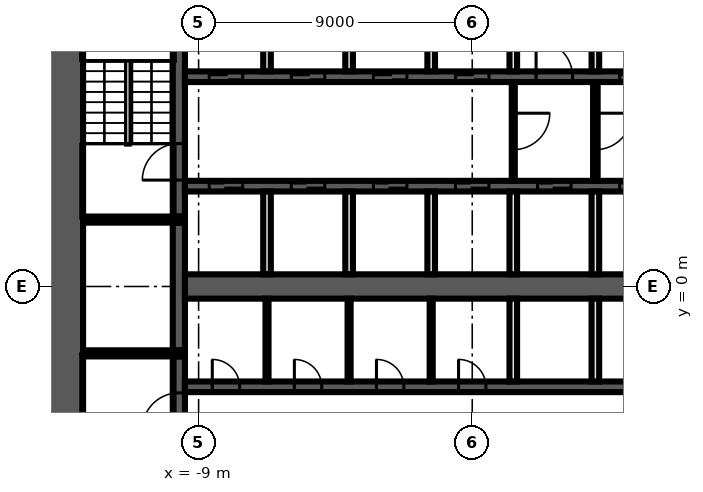
"""IFC4 building model, lengths in metres.
Left out: names, types, materials, properties, quantities, classifications, styles, units other than length and angle.
Written with IfcOpenShell. Run it as: python <this file> out.ifc"""

import sys

from ifc_helpers import new_model, si_unit, direction, frame, frame_2d, origin, place, context, subcontext, project, spatial, rectangle, extrude, element, fill, save


model = new_model("IFC4")
c1 = context("Model", 3, precision=1e-05, world=origin(), true_north=direction((0.0, 1.0)))
c2 = subcontext(c1, "Body", "Model", "MODEL_VIEW")
j1 = project(units=[si_unit("LENGTHUNIT", "METRE"), si_unit("PLANEANGLEUNIT", "RADIAN")], contexts=[c1])
p1 = place(None, origin())
s1 = spatial("IfcSite", under=j1, at=p1, CompositionType="ELEMENT")
p2 = place(p1, origin())
s2 = spatial("IfcBuilding", under=s1, at=p2, CompositionType="ELEMENT")
p3 = place(p2, frame((0.0, 0.0, 27.0)))
s3 = spatial("IfcBuildingStorey", under=s2, at=p3, CompositionType="ELEMENT", Elevation=27.0)
p4 = place(p3, frame((-13.4, -9.8, 0.0), z_axis=(0.0, 0.0, 1.0), x_axis=(0.0, 1.0, 0.0)))
e1 = element("IfcWall", 1, at=p4, inside=s3, PredefinedType="SHEAR", context=c2, shape_type="SweptSolid", body=[
    extrude(rectangle(XDim=19.6, YDim=1.2, at=frame_2d((9.8, 0.0))), origin(), (0.0, 0.0, 1.0), 5.55),
])
p5 = place(p3, frame((-9.65, -9.8, 0.0), z_axis=(0.0, 0.0, 1.0), x_axis=(0.0, 1.0, 0.0)))
e2 = element("IfcWall", 2, at=p5, inside=s3, PredefinedType="SHEAR", context=c2, shape_type="SweptSolid", body=[
    extrude(rectangle(XDim=7.5, YDim=0.4, at=frame_2d((3.75, 0.0))), origin(), (0.0, 0.0, 1.0), 5.55),
])
p6 = place(p5, frame((5.1, 0.0, 0.0)))
e3 = element("IfcOpeningElement", 3, at=p6, cuts=e2, PredefinedType="OPENING", context=c2, shape_type="SweptSolid", body=[
    extrude(rectangle(XDim=1.2, YDim=2.1, at=frame_2d((0.6, 1.05))), frame((0.0, 0.21, 0.0), z_axis=(0.0, -1.0, 0.0), x_axis=(1.0, 0.0, 0.0)), (0.0, 0.0, 1.0), 0.42),
])
p7 = place(p3, frame((-9.65, -2.1, 0.0), z_axis=(0.0, 0.0, 1.0), x_axis=(0.0, 1.0, 0.0)))
e4 = element("IfcWall", 4, at=p7, inside=s3, PredefinedType="SHEAR", context=c2, shape_type="SweptSolid", body=[
    extrude(rectangle(XDim=4.2, YDim=0.4, at=frame_2d((2.1, 0.0))), origin(), (0.0, 0.0, 1.0), 5.55),
])
p8 = place(p3, frame((-9.65, 2.3, 0.0), z_axis=(0.0, 0.0, 1.0), x_axis=(0.0, 1.0, 0.0)))
e5 = element("IfcWall", 5, at=p8, inside=s3, PredefinedType="SHEAR", context=c2, shape_type="SweptSolid", body=[
    extrude(rectangle(XDim=7.5, YDim=0.4, at=frame_2d((3.75, 0.0))), origin(), (0.0, 0.0, 1.0), 5.55),
])
p9 = place(p8, frame((1.2, 0.0, 0.0)))
e6 = element("IfcOpeningElement", 6, at=p9, cuts=e5, PredefinedType="OPENING", context=c2, shape_type="SweptSolid", body=[
    extrude(rectangle(XDim=1.2, YDim=2.1, at=frame_2d((0.6, 1.05))), frame((0.0, 0.21, 0.0), z_axis=(0.0, -1.0, 0.0), x_axis=(1.0, 0.0, 0.0)), (0.0, 0.0, 1.0), 0.42),
])
for number, where, z_axis, x_axis in (
    (7, (-9.45, 2.2, 0.0), (0.0, 0.0, 1.0), (-1.0, 0.0, 0.0)),
    (8, (-9.45, -2.2, 0.0), (0.0, 0.0, 1.0), (-1.0, 0.0, 0.0)),
):
    element("IfcWall", number, at=place(p3, frame(where, z_axis=z_axis, x_axis=x_axis)), inside=s3, PredefinedType="SHEAR", context=c2, shape_type="SweptSolid", body=[
        extrude(rectangle(XDim=3.35, YDim=0.2, at=frame_2d((1.675, 0.0))), origin(), (0.0, 0.0, 1.0), 5.55),
    ])
p10 = place(p3, frame((-9.45, 6.9, 0.0), z_axis=(0.0, 0.0, 1.0), x_axis=(1.0, 0.0, 0.0)))
e9 = element("IfcWall", 9, at=p10, inside=s3, PredefinedType="SHEAR", context=c2, shape_type="SweptSolid", body=[
    extrude(rectangle(XDim=18.9, YDim=0.35, at=frame_2d((9.45, 0.0))), origin(), (0.0, 0.0, 1.0), 5.55),
])
p11 = place(p10, frame((0.8, 0.0, 0.0)))
e10 = element("IfcOpeningElement", 10, at=p11, cuts=e9, PredefinedType="OPENING", context=c2, shape_type="SweptSolid", body=[
    extrude(rectangle(XDim=1.1, YDim=2.1, at=frame_2d((0.55, 1.05))), frame((0.0, 0.185, 0.0), z_axis=(0.0, -1.0, 0.0), x_axis=(1.0, 0.0, 0.0)), (0.0, 0.0, 1.0), 0.37),
])
p12 = place(p10, frame((3.5, 0.0, 0.0)))
e11 = element("IfcOpeningElement", 11, at=p12, cuts=e9, PredefinedType="OPENING", context=c2, shape_type="SweptSolid", body=[
    extrude(rectangle(XDim=1.1, YDim=2.1, at=frame_2d((0.55, 1.05))), frame((0.0, 0.185, 0.0), z_axis=(0.0, -1.0, 0.0), x_axis=(1.0, 0.0, 0.0)), (0.0, 0.0, 1.0), 0.37),
])
p13 = place(p10, frame((6.2, 0.0, 0.0)))
e12 = element("IfcOpeningElement", 12, at=p13, cuts=e9, PredefinedType="OPENING", context=c2, shape_type="SweptSolid", body=[
    extrude(rectangle(XDim=1.1, YDim=2.1, at=frame_2d((0.55, 1.05))), frame((0.0, 0.185, 0.0), z_axis=(0.0, -1.0, 0.0), x_axis=(1.0, 0.0, 0.0)), (0.0, 0.0, 1.0), 0.37),
])
p14 = place(p10, frame((8.9, 0.0, 0.0)))
e13 = element("IfcOpeningElement", 13, at=p14, cuts=e9, PredefinedType="OPENING", context=c2, shape_type="SweptSolid", body=[
    extrude(rectangle(XDim=1.1, YDim=2.1, at=frame_2d((0.55, 1.05))), frame((0.0, 0.185, 0.0), z_axis=(0.0, -1.0, 0.0), x_axis=(1.0, 0.0, 0.0)), (0.0, 0.0, 1.0), 0.37),
])
p15 = place(p10, frame((11.55, 0.0, 0.0)))
e14 = element("IfcOpeningElement", 14, at=p15, cuts=e9, PredefinedType="OPENING", context=c2, shape_type="SweptSolid", body=[
    extrude(rectangle(XDim=1.2, YDim=2.1, at=frame_2d((0.6, 1.05))), frame((0.0, 0.185, 0.0), z_axis=(0.0, -1.0, 0.0), x_axis=(1.0, 0.0, 0.0)), (0.0, 0.0, 1.0), 0.37),
])
p16 = place(p10, frame((14.3, 0.0, 0.0)))
e15 = element("IfcOpeningElement", 15, at=p16, cuts=e9, PredefinedType="OPENING", context=c2, shape_type="SweptSolid", body=[
    extrude(rectangle(XDim=1.1, YDim=2.1, at=frame_2d((0.55, 1.05))), frame((0.0, 0.185, 0.0), z_axis=(0.0, -1.0, 0.0), x_axis=(1.0, 0.0, 0.0)), (0.0, 0.0, 1.0), 0.37),
])
p17 = place(p10, frame((17.0, 0.0, 0.0)))
e16 = element("IfcOpeningElement", 16, at=p17, cuts=e9, PredefinedType="OPENING", context=c2, shape_type="SweptSolid", body=[
    extrude(rectangle(XDim=1.1, YDim=2.1, at=frame_2d((0.55, 1.05))), frame((0.0, 0.185, 0.0), z_axis=(0.0, -1.0, 0.0), x_axis=(1.0, 0.0, 0.0)), (0.0, 0.0, 1.0), 0.37),
])
p18 = place(p3, frame((9.45, 3.3, 0.0), z_axis=(0.0, 0.0, 1.0), x_axis=(-1.0, 0.0, 0.0)))
e17 = element("IfcWall", 17, at=p18, inside=s3, PredefinedType="SHEAR", context=c2, shape_type="SweptSolid", body=[
    extrude(rectangle(XDim=18.9, YDim=0.35, at=frame_2d((9.45, 0.0))), origin(), (0.0, 0.0, 1.0), 5.55),
])
p19 = place(p18, frame((17.0, 0.0, 0.0)))
e18 = element("IfcOpeningElement", 18, at=p19, cuts=e17, PredefinedType="OPENING", context=c2, shape_type="SweptSolid", body=[
    extrude(rectangle(XDim=1.1, YDim=2.1, at=frame_2d((0.55, 1.05))), frame((0.0, 0.185, 0.0), z_axis=(0.0, -1.0, 0.0), x_axis=(1.0, 0.0, 0.0)), (0.0, 0.0, 1.0), 0.37),
])
p20 = place(p18, frame((14.3, 0.0, 0.0)))
e19 = element("IfcOpeningElement", 19, at=p20, cuts=e17, PredefinedType="OPENING", context=c2, shape_type="SweptSolid", body=[
    extrude(rectangle(XDim=1.1, YDim=2.1, at=frame_2d((0.55, 1.05))), frame((0.0, 0.185, 0.0), z_axis=(0.0, -1.0, 0.0), x_axis=(1.0, 0.0, 0.0)), (0.0, 0.0, 1.0), 0.37),
])
p21 = place(p18, frame((11.6, 0.0, 0.0)))
e20 = element("IfcOpeningElement", 20, at=p21, cuts=e17, PredefinedType="OPENING", context=c2, shape_type="SweptSolid", body=[
    extrude(rectangle(XDim=1.1, YDim=2.1, at=frame_2d((0.55, 1.05))), frame((0.0, 0.185, 0.0), z_axis=(0.0, -1.0, 0.0), x_axis=(1.0, 0.0, 0.0)), (0.0, 0.0, 1.0), 0.37),
])
p22 = place(p18, frame((8.9, 0.0, 0.0)))
e21 = element("IfcOpeningElement", 21, at=p22, cuts=e17, PredefinedType="OPENING", context=c2, shape_type="SweptSolid", body=[
    extrude(rectangle(XDim=1.1, YDim=2.1, at=frame_2d((0.55, 1.05))), frame((0.0, 0.185, 0.0), z_axis=(0.0, -1.0, 0.0), x_axis=(1.0, 0.0, 0.0)), (0.0, 0.0, 1.0), 0.37),
])
p23 = place(p18, frame((6.2, 0.0, 0.0)))
e22 = element("IfcOpeningElement", 22, at=p23, cuts=e17, PredefinedType="OPENING", context=c2, shape_type="SweptSolid", body=[
    extrude(rectangle(XDim=1.1, YDim=2.1, at=frame_2d((0.55, 1.05))), frame((0.0, 0.185, 0.0), z_axis=(0.0, -1.0, 0.0), x_axis=(1.0, 0.0, 0.0)), (0.0, 0.0, 1.0), 0.37),
])
p24 = place(p18, frame((3.5, 0.0, 0.0)))
e23 = element("IfcOpeningElement", 23, at=p24, cuts=e17, PredefinedType="OPENING", context=c2, shape_type="SweptSolid", body=[
    extrude(rectangle(XDim=1.1, YDim=2.1, at=frame_2d((0.55, 1.05))), frame((0.0, 0.185, 0.0), z_axis=(0.0, -1.0, 0.0), x_axis=(1.0, 0.0, 0.0)), (0.0, 0.0, 1.0), 0.37),
])
p25 = place(p18, frame((0.9, 0.0, 0.0)))
e24 = element("IfcOpeningElement", 24, at=p25, cuts=e17, PredefinedType="OPENING", context=c2, shape_type="SweptSolid", body=[
    extrude(rectangle(XDim=0.9, YDim=2.1, at=frame_2d((0.45, 1.05))), frame((0.0, 0.185, 0.0), z_axis=(0.0, -1.0, 0.0), x_axis=(1.0, 0.0, 0.0)), (0.0, 0.0, 1.0), 0.37),
])
p26 = place(p3, frame((-9.45, -3.3, 0.0), z_axis=(0.0, 0.0, 1.0), x_axis=(1.0, 0.0, 0.0)))
e25 = element("IfcWall", 25, at=p26, inside=s3, PredefinedType="SHEAR", context=c2, shape_type="SweptSolid", body=[
    extrude(rectangle(XDim=18.9, YDim=0.35, at=frame_2d((9.45, 0.0))), origin(), (0.0, 0.0, 1.0), 5.55),
])
p27 = place(p26, frame((17.0, 0.0, 0.0)))
e26 = element("IfcOpeningElement", 26, at=p27, cuts=e25, PredefinedType="OPENING", context=c2, shape_type="SweptSolid", body=[
    extrude(rectangle(XDim=1.1, YDim=2.1, at=frame_2d((0.55, 1.05))), frame((0.0, 0.185, 0.0), z_axis=(0.0, -1.0, 0.0), x_axis=(1.0, 0.0, 0.0)), (0.0, 0.0, 1.0), 0.37),
])
p28 = place(p26, frame((0.9, 0.0, 0.0)))
e27 = element("IfcOpeningElement", 27, at=p28, cuts=e25, PredefinedType="OPENING", context=c2, shape_type="SweptSolid", body=[
    extrude(rectangle(XDim=0.9, YDim=2.1, at=frame_2d((0.45, 1.05))), frame((0.0, 0.185, 0.0), z_axis=(0.0, -1.0, 0.0), x_axis=(1.0, 0.0, 0.0)), (0.0, 0.0, 1.0), 0.37),
])
p29 = place(p26, frame((3.6, 0.0, 0.0)))
e28 = element("IfcOpeningElement", 28, at=p29, cuts=e25, PredefinedType="OPENING", context=c2, shape_type="SweptSolid", body=[
    extrude(rectangle(XDim=0.9, YDim=2.1, at=frame_2d((0.45, 1.05))), frame((0.0, 0.185, 0.0), z_axis=(0.0, -1.0, 0.0), x_axis=(1.0, 0.0, 0.0)), (0.0, 0.0, 1.0), 0.37),
])
p30 = place(p26, frame((6.3, 0.0, 0.0)))
e29 = element("IfcOpeningElement", 29, at=p30, cuts=e25, PredefinedType="OPENING", context=c2, shape_type="SweptSolid", body=[
    extrude(rectangle(XDim=0.9, YDim=2.1, at=frame_2d((0.45, 1.05))), frame((0.0, 0.185, 0.0), z_axis=(0.0, -1.0, 0.0), x_axis=(1.0, 0.0, 0.0)), (0.0, 0.0, 1.0), 0.37),
])
p31 = place(p26, frame((9.0, 0.0, 0.0)))
e30 = element("IfcOpeningElement", 30, at=p31, cuts=e25, PredefinedType="OPENING", context=c2, shape_type="SweptSolid", body=[
    extrude(rectangle(XDim=0.9, YDim=2.1, at=frame_2d((0.45, 1.05))), frame((0.0, 0.185, 0.0), z_axis=(0.0, -1.0, 0.0), x_axis=(1.0, 0.0, 0.0)), (0.0, 0.0, 1.0), 0.37),
])
p32 = place(p3, frame((-9.45, 0.0, 0.0), z_axis=(0.0, 0.0, 1.0), x_axis=(1.0, 0.0, 0.0)))
e31 = element("IfcWall", 31, at=p32, inside=s3, PredefinedType="SHEAR", context=c2, shape_type="SweptSolid", body=[
    extrude(rectangle(XDim=18.9, YDim=0.8, at=frame_2d((9.45, 0.0))), origin(), (0.0, 0.0, 1.0), 5.55),
])
p33 = place(p3, frame((4.05, 6.725, 0.0), z_axis=(0.0, 0.0, 1.0), x_axis=(0.0, -1.0, 0.0)))
e32 = element("IfcWall", 32, at=p33, inside=s3, PredefinedType="PARTITIONING", context=c2, shape_type="SweptSolid", body=[
    extrude(rectangle(XDim=3.25, YDim=0.15, at=frame_2d((1.625, 0.0))), origin(), (0.0, 0.0, 1.0), 5.55),
])
p34 = place(p33, frame((1.025, 0.0, 0.0)))
e33 = element("IfcOpeningElement", 33, at=p34, cuts=e32, PredefinedType="OPENING", context=c2, shape_type="SweptSolid", body=[
    extrude(rectangle(XDim=1.2, YDim=2.1, at=frame_2d((0.6, 1.05))), frame((0.0, 0.085, 0.0), z_axis=(0.0, -1.0, 0.0), x_axis=(1.0, 0.0, 0.0)), (0.0, 0.0, 1.0), 0.17),
])
for number, where, z_axis, x_axis in (
    (34, (4.05, -3.125, 0.0), (0.0, 0.0, 1.0), (0.0, 1.0, 0.0)),
    (35, (4.05, 0.4, 0.0), (0.0, 0.0, 1.0), (0.0, 1.0, 0.0)),
    (36, (4.05, 7.075, 0.0), (0.0, 0.0, 1.0), (0.0, 1.0, 0.0)),
):
    element("IfcWall", number, at=place(p3, frame(where, z_axis=z_axis, x_axis=x_axis)), inside=s3, PredefinedType="SOLIDWALL", context=c2, shape_type="SweptSolid", body=[
        extrude(rectangle(XDim=2.725, YDim=0.25, at=frame_2d((1.363, 0.0))), origin(), (0.0, 0.0, 1.0), 5.55),
    ])
p35 = place(p3, frame((1.35, 6.725, 0.0), z_axis=(0.0, 0.0, 1.0), x_axis=(0.0, -1.0, 0.0)))
e37 = element("IfcWall", 37, at=p35, inside=s3, PredefinedType="PARTITIONING", context=c2, shape_type="SweptSolid", body=[
    extrude(rectangle(XDim=3.25, YDim=0.1, at=frame_2d((1.625, 0.0))), origin(), (0.0, 0.0, 1.0), 5.55),
])
p36 = place(p35, frame((1.025, 0.0, 0.0)))
e38 = element("IfcOpeningElement", 38, at=p36, cuts=e37, PredefinedType="OPENING", context=c2, shape_type="SweptSolid", body=[
    extrude(rectangle(XDim=1.2, YDim=2.1, at=frame_2d((0.6, 1.05))), frame((0.0, 0.06, 0.0), z_axis=(0.0, -1.0, 0.0), x_axis=(1.0, 0.0, 0.0)), (0.0, 0.0, 1.0), 0.12),
])
for number, where, z_axis, x_axis in (
    (39, (1.35, -3.125, 0.0), (0.0, 0.0, 1.0), (0.0, 1.0, 0.0)),
    (40, (1.35, 0.4, 0.0), (0.0, 0.0, 1.0), (0.0, 1.0, 0.0)),
    (41, (1.35, 7.075, 0.0), (0.0, 0.0, 1.0), (0.0, 1.0, 0.0)),
):
    element("IfcWall", number, at=place(p3, frame(where, z_axis=z_axis, x_axis=x_axis)), inside=s3, PredefinedType="SOLIDWALL", context=c2, shape_type="SweptSolid", body=[
        extrude(rectangle(XDim=2.725, YDim=0.25, at=frame_2d((1.363, 0.0))), origin(), (0.0, 0.0, 1.0), 5.55),
    ])
p37 = place(p3, frame((-1.35, -3.125, 0.0), z_axis=(0.0, 0.0, 1.0), x_axis=(0.0, 1.0, 0.0)))
e42 = element("IfcWall", 42, at=p37, inside=s3, PredefinedType="PARTITIONING", context=c2, shape_type="SweptSolid", body=[
    extrude(rectangle(XDim=2.725, YDim=0.1, at=frame_2d((1.363, 0.0))), origin(), (0.0, 0.0, 1.0), 5.55),
])
for number, where, z_axis, x_axis in (
    (43, (-1.35, 0.4, 0.0), (0.0, 0.0, 1.0), (0.0, 1.0, 0.0)),
    (44, (-1.35, 7.075, 0.0), (0.0, 0.0, 1.0), (0.0, 1.0, 0.0)),
):
    element("IfcWall", number, at=place(p3, frame(where, z_axis=z_axis, x_axis=x_axis)), inside=s3, PredefinedType="SOLIDWALL", context=c2, shape_type="SweptSolid", body=[
        extrude(rectangle(XDim=2.725, YDim=0.25, at=frame_2d((1.363, 0.0))), origin(), (0.0, 0.0, 1.0), 5.55),
    ])
p38 = place(p3, frame((-4.05, -3.125, 0.0), z_axis=(0.0, 0.0, 1.0), x_axis=(0.0, 1.0, 0.0)))
e45 = element("IfcWall", 45, at=p38, inside=s3, PredefinedType="PARTITIONING", context=c2, shape_type="SweptSolid", body=[
    extrude(rectangle(XDim=2.725, YDim=0.1, at=frame_2d((1.363, 0.0))), origin(), (0.0, 0.0, 1.0), 5.55),
])
for number, where, z_axis, x_axis in (
    (46, (-4.05, 0.4, 0.0), (0.0, 0.0, 1.0), (0.0, 1.0, 0.0)),
    (47, (-4.05, 7.075, 0.0), (0.0, 0.0, 1.0), (0.0, 1.0, 0.0)),
):
    element("IfcWall", number, at=place(p3, frame(where, z_axis=z_axis, x_axis=x_axis)), inside=s3, PredefinedType="SOLIDWALL", context=c2, shape_type="SweptSolid", body=[
        extrude(rectangle(XDim=2.725, YDim=0.25, at=frame_2d((1.363, 0.0))), origin(), (0.0, 0.0, 1.0), 5.55),
    ])
p39 = place(p3, frame((-6.75, -3.125, 0.0), z_axis=(0.0, 0.0, 1.0), x_axis=(0.0, 1.0, 0.0)))
e48 = element("IfcWall", 48, at=p39, inside=s3, PredefinedType="PARTITIONING", context=c2, shape_type="SweptSolid", body=[
    extrude(rectangle(XDim=2.725, YDim=0.1, at=frame_2d((1.363, 0.0))), origin(), (0.0, 0.0, 1.0), 5.55),
])
for number, where, z_axis, x_axis in (
    (49, (-6.75, 0.4, 0.0), (0.0, 0.0, 1.0), (0.0, 1.0, 0.0)),
    (50, (-6.75, 7.075, 0.0), (0.0, 0.0, 1.0), (0.0, 1.0, 0.0)),
):
    element("IfcWall", number, at=place(p3, frame(where, z_axis=z_axis, x_axis=x_axis)), inside=s3, PredefinedType="SOLIDWALL", context=c2, shape_type="SweptSolid", body=[
        extrude(rectangle(XDim=2.725, YDim=0.25, at=frame_2d((1.363, 0.0))), origin(), (0.0, 0.0, 1.0), 5.55),
    ])
p40 = place(p11, origin())
e51 = element("IfcDoor", 51, at=p40, inside=s3, OperationType="DOUBLE_DOOR_SLIDING", PredefinedType="DOOR", context=c2, shape_type="SweptSolid", body=[
    extrude(rectangle(XDim=1.1, YDim=2.1, at=frame_2d((0.55, 1.05))), frame((0.0, 0.025, 0.0), z_axis=(0.0, -1.0, 0.0), x_axis=(1.0, 0.0, 0.0)), (0.0, 0.0, 1.0), 0.05),
])
fill(e10, e51)
p41 = place(p12, origin())
e52 = element("IfcDoor", 52, at=p41, inside=s3, OperationType="DOUBLE_DOOR_SLIDING", PredefinedType="DOOR", context=c2, shape_type="SweptSolid", body=[
    extrude(rectangle(XDim=1.1, YDim=2.1, at=frame_2d((0.55, 1.05))), frame((0.0, 0.025, 0.0), z_axis=(0.0, -1.0, 0.0), x_axis=(1.0, 0.0, 0.0)), (0.0, 0.0, 1.0), 0.05),
])
fill(e11, e52)
p42 = place(p13, origin())
e53 = element("IfcDoor", 53, at=p42, inside=s3, OperationType="DOUBLE_DOOR_SLIDING", PredefinedType="DOOR", context=c2, shape_type="SweptSolid", body=[
    extrude(rectangle(XDim=1.1, YDim=2.1, at=frame_2d((0.55, 1.05))), frame((0.0, 0.025, 0.0), z_axis=(0.0, -1.0, 0.0), x_axis=(1.0, 0.0, 0.0)), (0.0, 0.0, 1.0), 0.05),
])
fill(e12, e53)
p43 = place(p14, origin())
e54 = element("IfcDoor", 54, at=p43, inside=s3, OperationType="DOUBLE_DOOR_SLIDING", PredefinedType="DOOR", context=c2, shape_type="SweptSolid", body=[
    extrude(rectangle(XDim=1.1, YDim=2.1, at=frame_2d((0.55, 1.05))), frame((0.0, 0.025, 0.0), z_axis=(0.0, -1.0, 0.0), x_axis=(1.0, 0.0, 0.0)), (0.0, 0.0, 1.0), 0.05),
])
fill(e13, e54)
p44 = place(p15, origin())
e55 = element("IfcDoor", 55, at=p44, inside=s3, OperationType="SINGLE_SWING_LEFT", PredefinedType="DOOR", context=c2, shape_type="SweptSolid", body=[
    extrude(rectangle(XDim=1.2, YDim=2.1, at=frame_2d((0.6, 1.05))), frame((0.0, 0.025, 0.0), z_axis=(0.0, -1.0, 0.0), x_axis=(1.0, 0.0, 0.0)), (0.0, 0.0, 1.0), 0.05),
])
fill(e14, e55)
p45 = place(p16, origin())
e56 = element("IfcDoor", 56, at=p45, inside=s3, OperationType="DOUBLE_DOOR_SLIDING", PredefinedType="DOOR", context=c2, shape_type="SweptSolid", body=[
    extrude(rectangle(XDim=1.1, YDim=2.1, at=frame_2d((0.55, 1.05))), frame((0.0, 0.025, 0.0), z_axis=(0.0, -1.0, 0.0), x_axis=(1.0, 0.0, 0.0)), (0.0, 0.0, 1.0), 0.05),
])
fill(e15, e56)
p46 = place(p19, origin())
e57 = element("IfcDoor", 57, at=p46, inside=s3, OperationType="DOUBLE_DOOR_SLIDING", PredefinedType="DOOR", context=c2, shape_type="SweptSolid", body=[
    extrude(rectangle(XDim=1.1, YDim=2.1, at=frame_2d((0.55, 1.05))), frame((0.0, 0.025, 0.0), z_axis=(0.0, -1.0, 0.0), x_axis=(1.0, 0.0, 0.0)), (0.0, 0.0, 1.0), 0.05),
])
fill(e18, e57)
p47 = place(p20, origin())
e58 = element("IfcDoor", 58, at=p47, inside=s3, OperationType="DOUBLE_DOOR_SLIDING", PredefinedType="DOOR", context=c2, shape_type="SweptSolid", body=[
    extrude(rectangle(XDim=1.1, YDim=2.1, at=frame_2d((0.55, 1.05))), frame((0.0, 0.025, 0.0), z_axis=(0.0, -1.0, 0.0), x_axis=(1.0, 0.0, 0.0)), (0.0, 0.0, 1.0), 0.05),
])
fill(e19, e58)
p48 = place(p21, origin())
e59 = element("IfcDoor", 59, at=p48, inside=s3, OperationType="DOUBLE_DOOR_SLIDING", PredefinedType="DOOR", context=c2, shape_type="SweptSolid", body=[
    extrude(rectangle(XDim=1.1, YDim=2.1, at=frame_2d((0.55, 1.05))), frame((0.0, 0.025, 0.0), z_axis=(0.0, -1.0, 0.0), x_axis=(1.0, 0.0, 0.0)), (0.0, 0.0, 1.0), 0.05),
])
fill(e20, e59)
p49 = place(p22, origin())
e60 = element("IfcDoor", 60, at=p49, inside=s3, OperationType="DOUBLE_DOOR_SLIDING", PredefinedType="DOOR", context=c2, shape_type="SweptSolid", body=[
    extrude(rectangle(XDim=1.1, YDim=2.1, at=frame_2d((0.55, 1.05))), frame((0.0, 0.025, 0.0), z_axis=(0.0, -1.0, 0.0), x_axis=(1.0, 0.0, 0.0)), (0.0, 0.0, 1.0), 0.05),
])
fill(e21, e60)
p50 = place(p23, origin())
e61 = element("IfcDoor", 61, at=p50, inside=s3, OperationType="DOUBLE_DOOR_SLIDING", PredefinedType="DOOR", context=c2, shape_type="SweptSolid", body=[
    extrude(rectangle(XDim=1.1, YDim=2.1, at=frame_2d((0.55, 1.05))), frame((0.0, 0.025, 0.0), z_axis=(0.0, -1.0, 0.0), x_axis=(1.0, 0.0, 0.0)), (0.0, 0.0, 1.0), 0.05),
])
fill(e22, e61)
p51 = place(p24, origin())
e62 = element("IfcDoor", 62, at=p51, inside=s3, OperationType="DOUBLE_DOOR_SLIDING", PredefinedType="DOOR", context=c2, shape_type="SweptSolid", body=[
    extrude(rectangle(XDim=1.1, YDim=2.1, at=frame_2d((0.55, 1.05))), frame((0.0, 0.025, 0.0), z_axis=(0.0, -1.0, 0.0), x_axis=(1.0, 0.0, 0.0)), (0.0, 0.0, 1.0), 0.05),
])
fill(e23, e62)
p52 = place(p28, origin())
e63 = element("IfcDoor", 63, at=p52, inside=s3, OperationType="SINGLE_SWING_RIGHT", PredefinedType="DOOR", context=c2, shape_type="SweptSolid", body=[
    extrude(rectangle(XDim=0.9, YDim=2.1, at=frame_2d((0.45, 1.05))), frame((0.0, 0.025, 0.0), z_axis=(0.0, -1.0, 0.0), x_axis=(1.0, 0.0, 0.0)), (0.0, 0.0, 1.0), 0.05),
])
fill(e27, e63)
p53 = place(p29, origin())
e64 = element("IfcDoor", 64, at=p53, inside=s3, OperationType="SINGLE_SWING_LEFT", PredefinedType="DOOR", context=c2, shape_type="SweptSolid", body=[
    extrude(rectangle(XDim=0.9, YDim=2.1, at=frame_2d((0.45, 1.05))), frame((0.0, 0.025, 0.0), z_axis=(0.0, -1.0, 0.0), x_axis=(1.0, 0.0, 0.0)), (0.0, 0.0, 1.0), 0.05),
])
fill(e28, e64)
p54 = place(p30, origin())
e65 = element("IfcDoor", 65, at=p54, inside=s3, OperationType="SINGLE_SWING_RIGHT", PredefinedType="DOOR", context=c2, shape_type="SweptSolid", body=[
    extrude(rectangle(XDim=0.9, YDim=2.1, at=frame_2d((0.45, 1.05))), frame((0.0, 0.025, 0.0), z_axis=(0.0, -1.0, 0.0), x_axis=(1.0, 0.0, 0.0)), (0.0, 0.0, 1.0), 0.05),
])
fill(e29, e65)
p55 = place(p31, origin())
e66 = element("IfcDoor", 66, at=p55, inside=s3, OperationType="SINGLE_SWING_LEFT", PredefinedType="DOOR", context=c2, shape_type="SweptSolid", body=[
    extrude(rectangle(XDim=0.9, YDim=2.1, at=frame_2d((0.45, 1.05))), frame((0.0, 0.025, 0.0), z_axis=(0.0, -1.0, 0.0), x_axis=(1.0, 0.0, 0.0)), (0.0, 0.0, 1.0), 0.05),
])
fill(e30, e66)
p56 = place(p9, origin())
e67 = element("IfcDoor", 67, at=p56, inside=s3, OperationType="SINGLE_SWING_RIGHT", PredefinedType="DOOR", context=c2, shape_type="SweptSolid", body=[
    extrude(rectangle(XDim=1.2, YDim=2.1, at=frame_2d((0.6, 1.05))), frame((0.0, 0.025, 0.0), z_axis=(0.0, -1.0, 0.0), x_axis=(1.0, 0.0, 0.0)), (0.0, 0.0, 1.0), 0.05),
])
fill(e6, e67)
p57 = place(p6, origin())
e68 = element("IfcDoor", 68, at=p57, inside=s3, OperationType="SINGLE_SWING_LEFT", PredefinedType="DOOR", context=c2, shape_type="SweptSolid", body=[
    extrude(rectangle(XDim=1.2, YDim=2.1, at=frame_2d((0.6, 1.05))), frame((0.0, 0.025, 0.0), z_axis=(0.0, -1.0, 0.0), x_axis=(1.0, 0.0, 0.0)), (0.0, 0.0, 1.0), 0.05),
])
fill(e3, e68)
p58 = place(p36, origin())
e69 = element("IfcDoor", 69, at=p58, inside=s3, OperationType="SINGLE_SWING_LEFT", PredefinedType="DOOR", context=c2, shape_type="SweptSolid", body=[
    extrude(rectangle(XDim=1.2, YDim=2.1, at=frame_2d((0.6, 1.05))), frame((0.0, 0.025, 0.0), z_axis=(0.0, -1.0, 0.0), x_axis=(1.0, 0.0, 0.0)), (0.0, 0.0, 1.0), 0.05),
])
fill(e38, e69)
p59 = place(p34, origin())
e70 = element("IfcDoor", 70, at=p59, inside=s3, OperationType="SINGLE_SWING_RIGHT", PredefinedType="DOOR", context=c2, shape_type="SweptSolid", body=[
    extrude(rectangle(XDim=1.2, YDim=2.1, at=frame_2d((0.6, 1.05))), frame((0.0, 0.025, 0.0), z_axis=(0.0, -1.0, 0.0), x_axis=(1.0, 0.0, 0.0)), (0.0, 0.0, 1.0), 0.05),
])
fill(e33, e70)
save(model, sys.argv[1])
